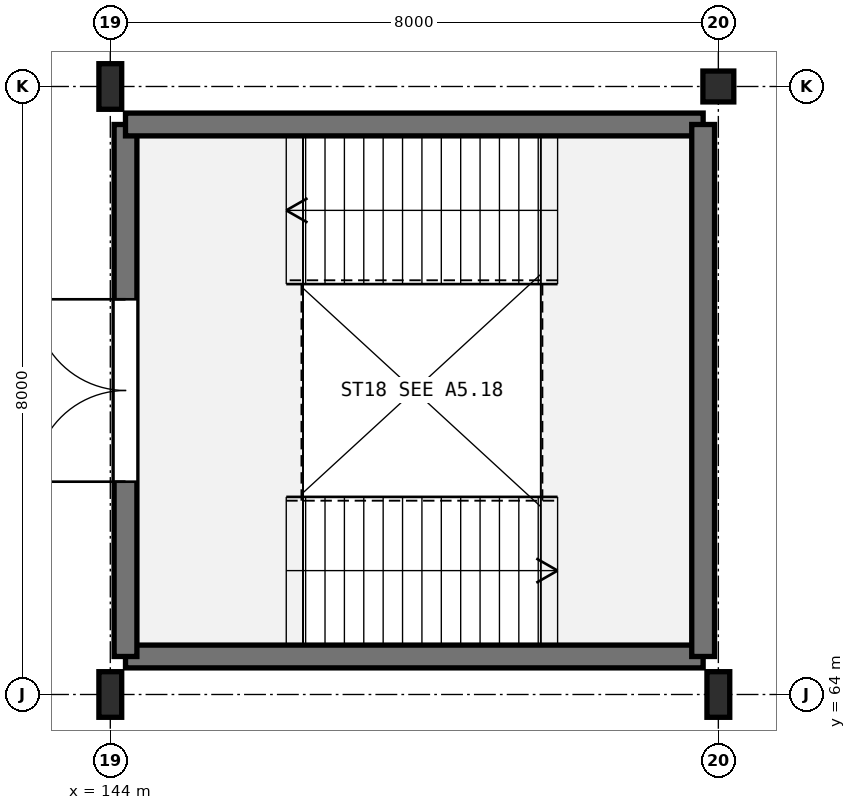
"""IFC4 building model, lengths in metres.
Left out: names, types, materials, properties, quantities, classifications, styles, units other than length and angle.
Written with IfcOpenShell. Run it as: python <this file> out.ifc"""

import sys

from ifc_helpers import new_model, si_unit, direction, frame, frame_2d, origin, origin_2d, place, context, subcontext, project, spatial, rectangle, hollow_circle, i_section, extrude, element, fill, save


model = new_model("IFC4")
c1 = context("Model", 3, precision=1e-05, world=origin(), true_north=direction((0.0, 1.0)))
c2 = subcontext(c1, "Body", "Model", "MODEL_VIEW")
j1 = project(units=[si_unit("LENGTHUNIT", "METRE"), si_unit("PLANEANGLEUNIT", "RADIAN")], contexts=[c1])
p1 = place(None, origin())
s1 = spatial("IfcSite", under=j1, at=p1, CompositionType="ELEMENT")
p2 = place(p1, origin())
s2 = spatial("IfcBuilding", under=s1, at=p2, CompositionType="ELEMENT")
p3 = place(p2, origin())
s3 = spatial("IfcBuildingStorey", under=s2, at=p3, CompositionType="ELEMENT", Elevation=0.0)
for number, where, z_axis, x_axis in (
    (1, (144.0, 64.0, 0.0), (0.0, 0.0, 1.0), (1.0, 0.0, 0.0)),
    (2, (144.0, 72.0, 0.0), (0.0, 0.0, 1.0), (1.0, 0.0, 0.0)),
    (3, (152.0, 64.0, 0.0), (0.0, 0.0, 1.0), (1.0, 0.0, 0.0)),
):
    element("IfcColumn", number, at=place(p3, frame(where, z_axis=z_axis, x_axis=x_axis)), inside=s3, PredefinedType="COLUMN", context=c2, shape_type="SweptSolid", body=[
        extrude(i_section(OverallWidth=0.3, OverallDepth=0.6, WebThickness=0.015, FlangeThickness=0.03, FilletRadius=0.027, at=origin_2d()), origin(), (0.0, 0.0, 1.0), 5.4),
    ])
p4 = place(p3, frame((152.0, 72.0, 0.0), z_axis=(0.0, 0.0, 1.0), x_axis=(1.0, 0.0, 0.0)))
e4 = element("IfcColumn", 4, at=p4, inside=s3, PredefinedType="COLUMN", context=c2, shape_type="SweptSolid", body=[
    extrude(hollow_circle(Radius=0.203, WallThickness=0.02, at=origin_2d()), origin(), (0.0, 0.0, 1.0), 5.4),
])
p5 = place(p3, frame((151.8, 64.5, 0.0), z_axis=(0.0, 0.0, 1.0), x_axis=(-1.0, 0.0, 0.0)))
e5 = element("IfcWall", 5, at=p5, inside=s3, PredefinedType="SHEAR", context=c2, shape_type="SweptSolid", body=[
    extrude(rectangle(XDim=7.6, YDim=0.3, at=frame_2d((3.8, 0.0))), origin(), (0.0, 0.0, 1.0), 5.08),
])
p6 = place(p3, frame((144.2, 64.5, 0.0), z_axis=(0.0, 0.0, 1.0), x_axis=(0.0, 1.0, 0.0)))
e6 = element("IfcWall", 6, at=p6, inside=s3, PredefinedType="SHEAR", context=c2, shape_type="SweptSolid", body=[
    extrude(rectangle(XDim=7.0, YDim=0.3, at=frame_2d((3.5, 0.0))), origin(), (0.0, 0.0, 1.0), 5.08),
])
p7 = place(p6, frame((2.3, 0.0, 0.0)))
e7 = element("IfcOpeningElement", 7, at=p7, cuts=e6, PredefinedType="OPENING", context=c2, shape_type="SweptSolid", body=[
    extrude(rectangle(XDim=2.4, YDim=2.2, at=frame_2d((1.2, 1.1))), frame((0.0, 0.16, 0.0), z_axis=(0.0, -1.0, 0.0), x_axis=(1.0, 0.0, 0.0)), (0.0, 0.0, 1.0), 0.32),
])
p8 = place(p3, frame((144.2, 71.5, 0.0), z_axis=(0.0, 0.0, 1.0), x_axis=(1.0, 0.0, 0.0)))
e8 = element("IfcWall", 8, at=p8, inside=s3, PredefinedType="SHEAR", context=c2, shape_type="SweptSolid", body=[
    extrude(rectangle(XDim=7.6, YDim=0.3, at=frame_2d((3.8, 0.0))), origin(), (0.0, 0.0, 1.0), 5.08),
])
p9 = place(p3, frame((151.8, 71.5, 0.0), z_axis=(0.0, 0.0, 1.0), x_axis=(0.0, -1.0, 0.0)))
e9 = element("IfcWall", 9, at=p9, inside=s3, PredefinedType="SHEAR", context=c2, shape_type="SweptSolid", body=[
    extrude(rectangle(XDim=7.0, YDim=0.3, at=frame_2d((3.5, 0.0))), origin(), (0.0, 0.0, 1.0), 5.08),
])
p10 = place(p7, origin())
e10 = element("IfcDoor", 10, at=p10, inside=s3, OperationType="DOUBLE_DOOR_SINGLE_SWING", PredefinedType="DOOR", context=c2, shape_type="SweptSolid", body=[
    extrude(rectangle(XDim=2.4, YDim=2.2, at=frame_2d((1.2, 1.1))), frame((0.0, 0.025, 0.0), z_axis=(0.0, -1.0, 0.0), x_axis=(1.0, 0.0, 0.0)), (0.0, 0.0, 1.0), 0.05),
])
fill(e7, e10)
save(model, sys.argv[1])
